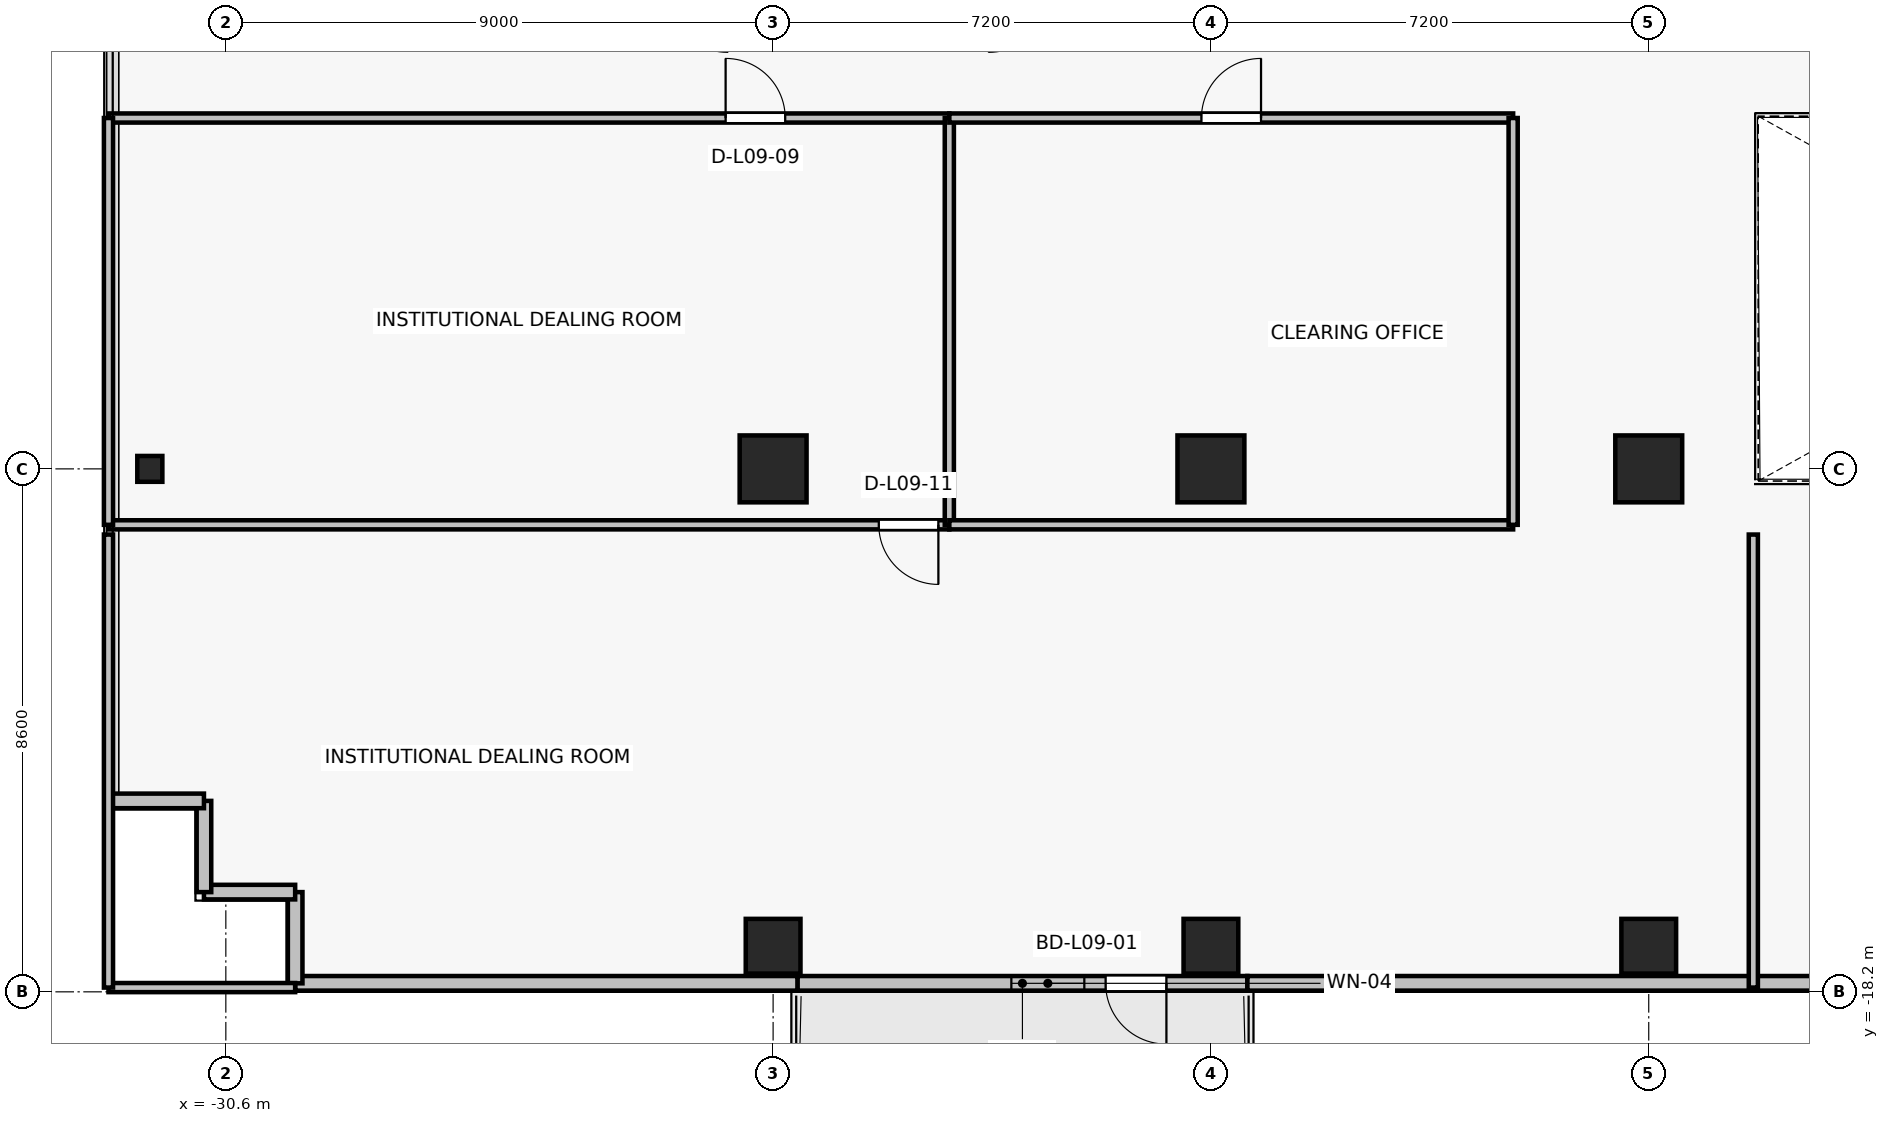
"""IFC4 building model, lengths in metres.
Left out: names, types, materials, properties, quantities, classifications, styles, units other than length and angle.
Written with IfcOpenShell. Run it as: python <this file> out.ifc"""

import sys

from ifc_helpers import new_model, si_unit, direction, frame, frame_2d, origin, origin_2d, place, context, subcontext, project, spatial, rectangle, i_section, extrude, source, transform, mapped, element, fill, save


model = new_model("IFC4")
c1 = context("Model", 3, precision=1e-05, world=origin(), true_north=direction((0.0, 1.0)))
c2 = subcontext(c1, "Body", "Model", "MODEL_VIEW")
j1 = project(units=[si_unit("LENGTHUNIT", "METRE"), si_unit("PLANEANGLEUNIT", "RADIAN")], contexts=[c1])
p1 = place(None, origin())
s1 = spatial("IfcSite", under=j1, at=p1, CompositionType="ELEMENT")
p2 = place(p1, origin())
s2 = spatial("IfcBuilding", under=s1, at=p2, CompositionType="ELEMENT")
p3 = place(p2, frame((0.0, 0.0, 37.3)))
s3 = spatial("IfcBuildingStorey", under=s2, at=p3, CompositionType="ELEMENT", Elevation=37.3)
for number, where, z_axis, x_axis in (
    (1, (-14.4, -9.6, 0.0), (0.0, 0.0, 1.0), (1.0, 0.0, 0.0)),
    (2, (-7.2, -9.6, 0.0), (0.0, 0.0, 1.0), (1.0, 0.0, 0.0)),
    (3, (-21.6, -9.6, 0.0), (0.0, 0.0, 1.0), (1.0, 0.0, 0.0)),
):
    element("IfcColumn", number, at=place(p3, frame(where, z_axis=z_axis, x_axis=x_axis)), inside=s3, PredefinedType="COLUMN", context=c2, shape_type="SweptSolid", body=[
        extrude(rectangle(XDim=1.1, YDim=1.1, at=origin_2d()), origin(), (0.0, 0.0, 1.0), 3.3),
    ])
for number, where, z_axis, x_axis in (
    (4, (-14.4, -17.45, 0.0), (0.0, 0.0, 1.0), (1.0, 0.0, 0.0)),
    (5, (-7.2, -17.45, 0.0), (0.0, 0.0, 1.0), (1.0, 0.0, 0.0)),
    (6, (-21.6, -17.45, 0.0), (0.0, 0.0, 1.0), (1.0, 0.0, 0.0)),
):
    element("IfcColumn", number, at=place(p3, frame(where, z_axis=z_axis, x_axis=x_axis)), inside=s3, PredefinedType="COLUMN", context=c2, shape_type="SweptSolid", body=[
        extrude(rectangle(XDim=0.9, YDim=0.9, at=origin_2d()), origin(), (0.0, 0.0, 1.0), 3.3),
    ])
p4 = place(p3, frame((-31.85, -9.6, 0.0), z_axis=(0.0, 0.0, 1.0), x_axis=(1.0, 0.0, 0.0)))
e7 = element("IfcColumn", 7, at=p4, inside=s3, PredefinedType="COLUMN", context=c2, shape_type="SweptSolid", body=[
    extrude(i_section(OverallWidth=0.412, OverallDepth=0.425, WebThickness=0.026, FlangeThickness=0.039, FilletRadius=0.015, at=origin_2d()), origin(), (0.0, 0.0, 1.0), 3.3),
])
p5 = place(p3, frame((-13.8, -18.06, 0.0), z_axis=(0.0, 0.0, 1.0), x_axis=(-1.0, 0.0, 0.0)))
e8 = element("IfcWall", 8, at=p5, inside=s3, PredefinedType="SOLIDWALL", context=c2, shape_type="SweptSolid", body=[
    extrude(rectangle(XDim=7.4, YDim=0.24, at=frame_2d((3.7, 0.0))), origin(), (0.0, 0.0, 1.0), 2.665),
])
p6 = place(p5, frame((1.332, 0.0, 0.0)))
e9 = element("IfcOpeningElement", 9, at=p6, cuts=e8, PredefinedType="OPENING", context=c2, shape_type="SweptSolid", body=[
    extrude(rectangle(XDim=1.0, YDim=2.2, at=frame_2d((0.5, 1.1))), frame((0.0, 0.13, 0.0), z_axis=(0.0, -1.0, 0.0), x_axis=(1.0, 0.0, 0.0)), (0.0, 0.0, 1.0), 0.26),
])
p7 = place(p5, frame((2.682, 0.0, 0.85)))
e10 = element("IfcOpeningElement", 10, at=p7, cuts=e8, PredefinedType="OPENING", context=c2, shape_type="SweptSolid", body=[
    extrude(rectangle(XDim=1.2, YDim=1.5, at=frame_2d((0.6, 0.75))), frame((0.0, 0.13, 0.0), z_axis=(0.0, -1.0, 0.0), x_axis=(1.0, 0.0, 0.0)), (0.0, 0.0, 1.0), 0.26),
])
p8 = place(p3, frame((-13.8, -18.06, 0.0), z_axis=(0.0, 0.0, 1.0), x_axis=(1.0, 0.0, 0.0)))
e11 = element("IfcWall", 11, at=p8, inside=s3, PredefinedType="SOLIDWALL", context=c2, shape_type="SweptSolid", body=[
    extrude(rectangle(XDim=10.46, YDim=0.24, at=frame_2d((5.23, 0.0))), origin(), (0.0, 0.0, 1.0), 2.665),
])
p9 = place(p3, frame((-29.46, -18.06, 0.0), z_axis=(0.0, 0.0, 1.0), x_axis=(1.0, 0.0, 0.0)))
e12 = element("IfcWall", 12, at=p9, inside=s3, PredefinedType="SOLIDWALL", context=c2, shape_type="SweptSolid", body=[
    extrude(rectangle(XDim=8.26, YDim=0.24, at=frame_2d((4.13, 0.0))), origin(), (0.0, 0.0, 1.0), 3.075),
])
for number, where, z_axis, x_axis in (
    (13, (-29.46, -16.56, 0.0), (0.0, 0.0, 1.0), (0.0, -1.0, 0.0)),
    (14, (-30.96, -16.56, 0.0), (0.0, 0.0, 1.0), (1.0, 0.0, 0.0)),
    (15, (-30.96, -15.06, 0.0), (0.0, 0.0, 1.0), (0.0, -1.0, 0.0)),
    (16, (-32.46, -15.06, 0.0), (0.0, 0.0, 1.0), (1.0, 0.0, 0.0)),
):
    element("IfcWall", number, at=place(p3, frame(where, z_axis=z_axis, x_axis=x_axis)), inside=s3, PredefinedType="SOLIDWALL", context=c2, shape_type="SweptSolid", body=[
        extrude(rectangle(XDim=1.5, YDim=0.24, at=frame_2d((0.75, 0.0))), origin(), (0.0, 0.0, 1.0), 3.075),
    ])
p10 = place(p3, frame((-18.702, -10.52, 0.0), z_axis=(0.0, 0.0, 1.0), x_axis=(-1.0, 0.0, 0.0)))
e17 = element("IfcWall", 17, at=p10, inside=s3, PredefinedType="PARTITIONING", context=c2, shape_type="SweptSolid", body=[
    extrude(rectangle(XDim=13.828, YDim=0.15, at=frame_2d((6.914, 0.0))), origin(), (0.0, 0.0, 1.0), 2.465),
])
p11 = place(p10, frame((0.18, 0.0, 0.0)))
e18 = element("IfcOpeningElement", 18, at=p11, cuts=e17, PredefinedType="OPENING", context=c2, shape_type="SweptSolid", body=[
    extrude(rectangle(XDim=0.98, YDim=2.15, at=frame_2d((0.49, 1.075))), frame((0.0, 0.085, 0.0), z_axis=(0.0, -1.0, 0.0), x_axis=(1.0, 0.0, 0.0)), (0.0, 0.0, 1.0), 0.17),
])
p12 = place(p3, frame((-32.53, -3.83, 0.0), z_axis=(0.0, 0.0, 1.0), x_axis=(1.0, 0.0, 0.0)))
e19 = element("IfcWall", 19, at=p12, inside=s3, PredefinedType="PARTITIONING", context=c2, shape_type="SweptSolid", body=[
    extrude(rectangle(XDim=13.828, YDim=0.15, at=frame_2d((6.914, 0.0))), origin(), (0.0, 0.0, 1.0), 2.465),
])
p13 = place(p12, frame((10.149, 0.0, 0.0)))
e20 = element("IfcOpeningElement", 20, at=p13, cuts=e19, PredefinedType="OPENING", context=c2, shape_type="SweptSolid", body=[
    extrude(rectangle(XDim=0.98, YDim=2.15, at=frame_2d((0.49, 1.075))), frame((0.0, 0.085, 0.0), z_axis=(0.0, -1.0, 0.0), x_axis=(1.0, 0.0, 0.0)), (0.0, 0.0, 1.0), 0.17),
])
p14 = place(p3, frame((-32.53, -10.52, 0.0), z_axis=(0.0, 0.0, 1.0), x_axis=(0.0, 1.0, 0.0)))
e21 = element("IfcWall", 21, at=p14, inside=s3, PredefinedType="PARTITIONING", context=c2, shape_type="SweptSolid", body=[
    extrude(rectangle(XDim=6.69, YDim=0.15, at=frame_2d((3.345, 0.0))), origin(), (0.0, 0.0, 1.0), 2.665),
])
p15 = place(p3, frame((-18.702, -3.83, 0.0), z_axis=(0.0, 0.0, 1.0), x_axis=(0.0, -1.0, 0.0)))
e22 = element("IfcWall", 22, at=p15, inside=s3, PredefinedType="PARTITIONING", context=c2, shape_type="SweptSolid", body=[
    extrude(rectangle(XDim=6.69, YDim=0.15, at=frame_2d((3.345, 0.0))), origin(), (0.0, 0.0, 1.0), 2.465),
])
p16 = place(p3, frame((-9.43, -10.52, 0.0), z_axis=(0.0, 0.0, 1.0), x_axis=(-1.0, 0.0, 0.0)))
e23 = element("IfcWall", 23, at=p16, inside=s3, PredefinedType="PARTITIONING", context=c2, shape_type="SweptSolid", body=[
    extrude(rectangle(XDim=9.272, YDim=0.15, at=frame_2d((4.636, 0.0))), origin(), (0.0, 0.0, 1.0), 2.465),
])
p17 = place(p3, frame((-18.702, -3.83, 0.0), z_axis=(0.0, 0.0, 1.0), x_axis=(1.0, 0.0, 0.0)))
e24 = element("IfcWall", 24, at=p17, inside=s3, PredefinedType="PARTITIONING", context=c2, shape_type="SweptSolid", body=[
    extrude(rectangle(XDim=9.272, YDim=0.15, at=frame_2d((4.636, 0.0))), origin(), (0.0, 0.0, 1.0), 2.465),
])
p18 = place(p17, frame((4.146, 0.0, 0.0)))
e25 = element("IfcOpeningElement", 25, at=p18, cuts=e24, PredefinedType="OPENING", context=c2, shape_type="SweptSolid", body=[
    extrude(rectangle(XDim=0.98, YDim=2.15, at=frame_2d((0.49, 1.075))), frame((0.0, 0.085, 0.0), z_axis=(0.0, -1.0, 0.0), x_axis=(1.0, 0.0, 0.0)), (0.0, 0.0, 1.0), 0.17),
])
p19 = place(p3, frame((-9.43, -3.83, 0.0), z_axis=(0.0, 0.0, 1.0), x_axis=(0.0, -1.0, 0.0)))
e26 = element("IfcWall", 26, at=p19, inside=s3, PredefinedType="PARTITIONING", context=c2, shape_type="SweptSolid", body=[
    extrude(rectangle(XDim=6.69, YDim=0.15, at=frame_2d((3.345, 0.0))), origin(), (0.0, 0.0, 1.0), 2.465),
])
p20 = place(p3, frame((-29.46, -18.13, 0.0), z_axis=(0.0, 0.0, 1.0), x_axis=(-1.0, 0.0, 0.0)))
e27 = element("IfcWall", 27, at=p20, inside=s3, PredefinedType="PARTITIONING", context=c2, shape_type="SweptSolid", body=[
    extrude(rectangle(XDim=3.07, YDim=0.15, at=frame_2d((1.535, 0.0))), origin(), (0.0, 0.0, 1.0), 2.665),
])
p21 = place(p3, frame((-32.53, -18.13, 0.0), z_axis=(0.0, 0.0, 1.0), x_axis=(0.0, 1.0, 0.0)))
e28 = element("IfcWall", 28, at=p21, inside=s3, PredefinedType="PARTITIONING", context=c2, shape_type="SweptSolid", body=[
    extrude(rectangle(XDim=7.45, YDim=0.15, at=frame_2d((3.725, 0.0))), origin(), (0.0, 0.0, 1.0), 3.075),
])
p22 = place(p3, frame((-5.48, -10.68, 0.0), z_axis=(0.0, 0.0, 1.0), x_axis=(0.0, -1.0, 0.0)))
e29 = element("IfcWall", 29, at=p22, inside=s3, PredefinedType="PARTITIONING", context=c2, shape_type="SweptSolid", body=[
    extrude(rectangle(XDim=7.45, YDim=0.15, at=frame_2d((3.725, 0.0))), origin(), (0.0, 0.0, 1.0), 2.465),
])
m1 = source(origin(), c2, "Body", "SweptSolid", [
    extrude(rectangle(XDim=1.0, YDim=2.2, at=frame_2d((0.5, 1.1))), frame((0.0, 0.025, 0.0), z_axis=(0.0, -1.0, 0.0), x_axis=(1.0, 0.0, 0.0)), (0.0, 0.0, 1.0), 0.05),
])
p23 = place(p6, origin())
e30 = element("IfcDoor", 30, at=p23, inside=s3, OperationType="SINGLE_SWING_LEFT", PredefinedType="DOOR", context=c2, shape_type="MappedRepresentation", body=[
    mapped(m1, transform((0.0, 0.0, 0.0), x_axis=(1.0, 0.0, 0.0), y_axis=(0.0, 1.0, 0.0), z_axis=(0.0, 0.0, 1.0), scale=1.0)),
])
fill(e9, e30)
m2 = source(origin(), c2, "Body", "SweptSolid", [
    extrude(rectangle(XDim=1.2, YDim=1.5, at=frame_2d((0.6, 0.75))), frame((0.0, 0.03, 0.0), z_axis=(0.0, -1.0, 0.0), x_axis=(1.0, 0.0, 0.0)), (0.0, 0.0, 1.0), 0.06),
])
p24 = place(p7, origin())
e31 = element("IfcWindow", 31, at=p24, inside=s3, PartitioningType="SINGLE_PANEL", PredefinedType="WINDOW", context=c2, shape_type="MappedRepresentation", body=[
    mapped(m2, transform((0.0, 0.0, 0.0), x_axis=(1.0, 0.0, 0.0), y_axis=(0.0, 1.0, 0.0), z_axis=(0.0, 0.0, 1.0), scale=1.0)),
])
fill(e10, e31)
m3 = source(origin(), c2, "Body", "SweptSolid", [
    extrude(rectangle(XDim=0.98, YDim=2.15, at=frame_2d((0.49, 1.075))), frame((0.0, 0.025, 0.0), z_axis=(0.0, -1.0, 0.0), x_axis=(1.0, 0.0, 0.0)), (0.0, 0.0, 1.0), 0.05),
])
p25 = place(p13, origin())
e32 = element("IfcDoor", 32, at=p25, inside=s3, OperationType="SINGLE_SWING_LEFT", PredefinedType="DOOR", context=c2, shape_type="MappedRepresentation", body=[
    mapped(m3, transform((0.0, 0.0, 0.0), x_axis=(1.0, 0.0, 0.0), y_axis=(0.0, 1.0, 0.0), z_axis=(0.0, 0.0, 1.0), scale=1.0)),
])
fill(e20, e32)
p26 = place(p18, origin())
e33 = element("IfcDoor", 33, at=p26, inside=s3, OperationType="SINGLE_SWING_RIGHT", PredefinedType="DOOR", context=c2, shape_type="MappedRepresentation", body=[
    mapped(m3, transform((0.0, 0.0, 0.0), x_axis=(1.0, 0.0, 0.0), y_axis=(0.0, 1.0, 0.0), z_axis=(0.0, 0.0, 1.0), scale=1.0)),
])
fill(e25, e33)
p27 = place(p11, origin())
e34 = element("IfcDoor", 34, at=p27, inside=s3, OperationType="SINGLE_SWING_LEFT", PredefinedType="DOOR", context=c2, shape_type="MappedRepresentation", body=[
    mapped(m3, transform((0.0, 0.0, 0.0), x_axis=(1.0, 0.0, 0.0), y_axis=(0.0, 1.0, 0.0), z_axis=(0.0, 0.0, 1.0), scale=1.0)),
])
fill(e18, e34)
save(model, sys.argv[1])
